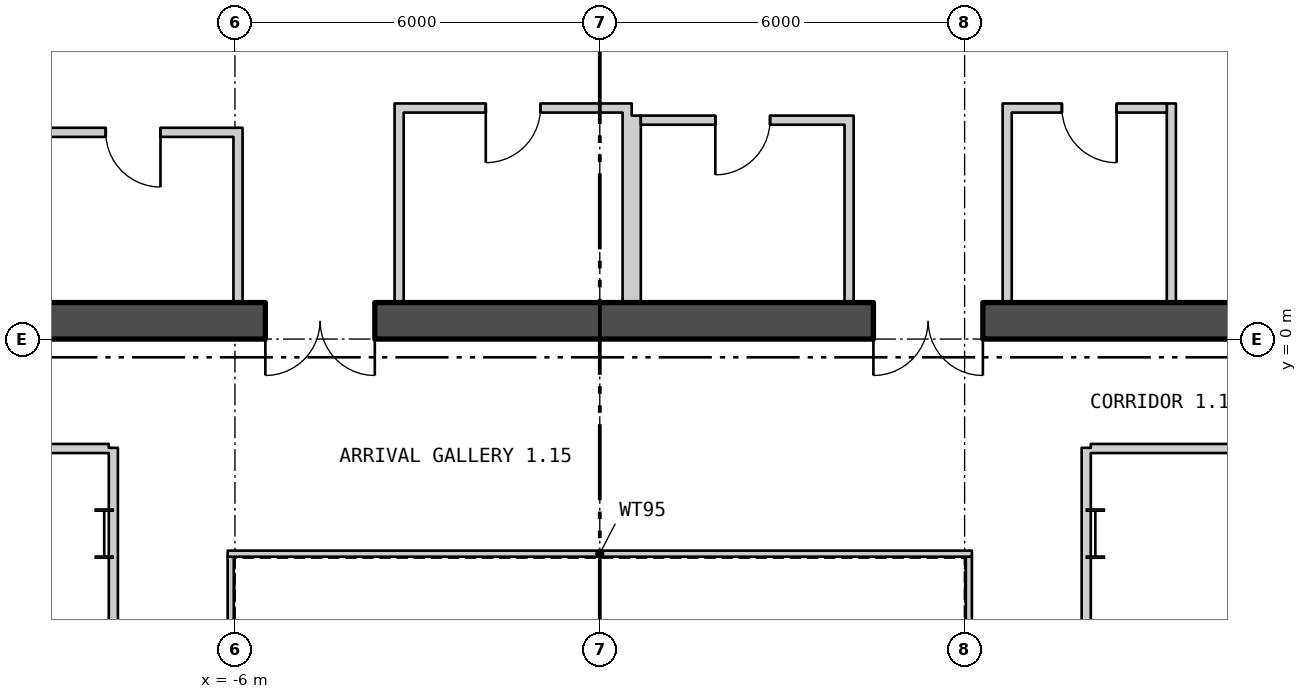
"""IFC4 building model, lengths in metres.
Left out: names, types, materials, properties, quantities, classifications, styles, units other than length and angle.
Written with IfcOpenShell. Run it as: python <this file> out.ifc"""

import sys

from ifc_helpers import new_model, si_unit, direction, frame, frame_2d, origin, origin_2d, place, context, subcontext, project, spatial, polyline, rectangle, i_section, outline, extrude, element, fill, save


model = new_model("IFC4")
c1 = context("Model", 3, precision=1e-05, world=origin(), true_north=direction((0.0, 1.0)))
c2 = subcontext(c1, "Body", "Model", "MODEL_VIEW")
j1 = project(units=[si_unit("LENGTHUNIT", "METRE"), si_unit("PLANEANGLEUNIT", "RADIAN")], contexts=[c1])
p1 = place(None, origin())
s1 = spatial("IfcSite", under=j1, at=p1, CompositionType="ELEMENT")
p2 = place(p1, origin())
s2 = spatial("IfcBuilding", under=s1, at=p2, CompositionType="ELEMENT")
p3 = place(p2, frame((0.0, 0.0, 28.8)))
s3 = spatial("IfcBuildingStorey", under=s2, at=p3, CompositionType="ELEMENT", Elevation=28.8)
for number, where, z_axis, x_axis in (
    (1, (8.15, -3.2, 0.0), (0.0, 0.0, 1.0), (1.0, 0.0, 0.0)),
    (2, (-8.15, -3.2, 0.0), (0.0, 0.0, 1.0), (1.0, 0.0, 0.0)),
):
    element("IfcColumn", number, at=place(p3, frame(where, z_axis=z_axis, x_axis=x_axis)), inside=s3, PredefinedType="COLUMN", context=c2, shape_type="SweptSolid", body=[
        extrude(i_section(OverallWidth=0.303, OverallDepth=0.814, WebThickness=0.021, FlangeThickness=0.04, at=origin_2d()), origin(), (0.0, 0.0, 1.0), 4.5),
    ])
p4 = place(p3, frame((-28.74, 9.808, -0.23), z_axis=(0.0, 0.0, 1.0), x_axis=(0.499999764979, -0.866025539474, 0.0)))
e3 = element("IfcWall", 3, at=p4, inside=s3, PredefinedType="SOLIDWALL", context=c2, shape_type="SweptSolid", body=[
    extrude(outline(polyline([(-0.13, -0.225), (45.87, -0.225), (45.61, 0.225), (0.13, 0.225), (-0.13, -0.225)])), origin(), (0.0, 0.0, 1.0), 4.55),
])
p5 = place(p4, frame((1.724, 0.0, 0.23)))
e4 = element("IfcOpeningElement", 4, at=p5, cuts=e3, PredefinedType="OPENING", context=c2, shape_type="SweptSolid", body=[
    extrude(rectangle(XDim=1.8, YDim=2.4, at=frame_2d((0.9, 1.2))), frame((0.0, 0.235, 0.0), z_axis=(0.0, -1.0, 0.0), x_axis=(1.0, 0.0, 0.0)), (0.0, 0.0, 1.0), 0.47),
])
p6 = place(p4, frame((5.893, 0.0, 1.13)))
e5 = element("IfcOpeningElement", 5, at=p6, cuts=e3, PredefinedType="OPENING", context=c2, shape_type="SweptSolid", body=[
    extrude(rectangle(XDim=2.4, YDim=2.6, at=frame_2d((1.2, 1.3))), frame((0.0, 0.235, 0.0), z_axis=(0.0, -1.0, 0.0), x_axis=(1.0, 0.0, 0.0)), (0.0, 0.0, 1.0), 0.47),
])
p7 = place(p4, frame((10.401, 0.0, 1.13)))
e6 = element("IfcOpeningElement", 6, at=p7, cuts=e3, PredefinedType="OPENING", context=c2, shape_type="SweptSolid", body=[
    extrude(rectangle(XDim=2.4, YDim=2.6, at=frame_2d((1.2, 1.3))), frame((0.0, 0.235, 0.0), z_axis=(0.0, -1.0, 0.0), x_axis=(1.0, 0.0, 0.0)), (0.0, 0.0, 1.0), 0.47),
])
p8 = place(p4, frame((14.909, 0.0, 1.13)))
e7 = element("IfcOpeningElement", 7, at=p8, cuts=e3, PredefinedType="OPENING", context=c2, shape_type="SweptSolid", body=[
    extrude(rectangle(XDim=2.4, YDim=2.6, at=frame_2d((1.2, 1.3))), frame((0.0, 0.235, 0.0), z_axis=(0.0, -1.0, 0.0), x_axis=(1.0, 0.0, 0.0)), (0.0, 0.0, 1.0), 0.47),
])
p9 = place(p4, frame((19.416, 0.0, 1.13)))
e8 = element("IfcOpeningElement", 8, at=p9, cuts=e3, PredefinedType="OPENING", context=c2, shape_type="SweptSolid", body=[
    extrude(rectangle(XDim=2.4, YDim=2.6, at=frame_2d((1.2, 1.3))), frame((0.0, 0.235, 0.0), z_axis=(0.0, -1.0, 0.0), x_axis=(1.0, 0.0, 0.0)), (0.0, 0.0, 1.0), 0.47),
])
p10 = place(p4, frame((23.924, 0.0, 1.13)))
e9 = element("IfcOpeningElement", 9, at=p10, cuts=e3, PredefinedType="OPENING", context=c2, shape_type="SweptSolid", body=[
    extrude(rectangle(XDim=2.4, YDim=2.6, at=frame_2d((1.2, 1.3))), frame((0.0, 0.235, 0.0), z_axis=(0.0, -1.0, 0.0), x_axis=(1.0, 0.0, 0.0)), (0.0, 0.0, 1.0), 0.47),
])
p11 = place(p4, frame((28.431, 0.0, 1.13)))
e10 = element("IfcOpeningElement", 10, at=p11, cuts=e3, PredefinedType="OPENING", context=c2, shape_type="SweptSolid", body=[
    extrude(rectangle(XDim=2.4, YDim=2.6, at=frame_2d((1.2, 1.3))), frame((0.0, 0.235, 0.0), z_axis=(0.0, -1.0, 0.0), x_axis=(1.0, 0.0, 0.0)), (0.0, 0.0, 1.0), 0.47),
])
p12 = place(p4, frame((33.239, 0.0, 0.23)))
e11 = element("IfcOpeningElement", 11, at=p12, cuts=e3, PredefinedType="OPENING", context=c2, shape_type="SweptSolid", body=[
    extrude(rectangle(XDim=1.8, YDim=2.4, at=frame_2d((0.9, 1.2))), frame((0.0, 0.235, 0.0), z_axis=(0.0, -1.0, 0.0), x_axis=(1.0, 0.0, 0.0)), (0.0, 0.0, 1.0), 0.47),
])
p13 = place(p4, frame((37.447, 0.0, 1.13)))
e12 = element("IfcOpeningElement", 12, at=p13, cuts=e3, PredefinedType="OPENING", context=c2, shape_type="SweptSolid", body=[
    extrude(rectangle(XDim=2.4, YDim=2.6, at=frame_2d((1.2, 1.3))), frame((0.0, 0.235, 0.0), z_axis=(0.0, -1.0, 0.0), x_axis=(1.0, 0.0, 0.0)), (0.0, 0.0, 1.0), 0.47),
])
p14 = place(p4, frame((41.916, 0.0, 1.13)))
e13 = element("IfcOpeningElement", 13, at=p14, cuts=e3, PredefinedType="OPENING", context=c2, shape_type="SweptSolid", body=[
    extrude(rectangle(XDim=2.4, YDim=2.6, at=frame_2d((1.2, 1.3))), frame((0.0, 0.235, 0.0), z_axis=(0.0, -1.0, 0.0), x_axis=(1.0, 0.0, 0.0)), (0.0, 0.0, 1.0), 0.47),
])
p15 = place(p3, frame((5.87, -29.805, -0.23), z_axis=(0.0, 0.0, 1.0), x_axis=(0.499999764979, 0.866025539474, 0.0)))
e14 = element("IfcWall", 14, at=p15, inside=s3, PredefinedType="SOLIDWALL", context=c2, shape_type="SweptSolid", body=[
    extrude(outline(polyline([(-0.13, -0.225), (45.87, -0.225), (45.61, 0.225), (0.13, 0.225), (-0.13, -0.225)])), origin(), (0.0, 0.0, 1.0), 4.55),
])
p16 = place(p15, frame((1.424, 0.0, 1.13)))
e15 = element("IfcOpeningElement", 15, at=p16, cuts=e14, PredefinedType="OPENING", context=c2, shape_type="SweptSolid", body=[
    extrude(rectangle(XDim=2.4, YDim=2.6, at=frame_2d((1.2, 1.3))), frame((0.0, 0.235, 0.0), z_axis=(0.0, -1.0, 0.0), x_axis=(1.0, 0.0, 0.0)), (0.0, 0.0, 1.0), 0.47),
])
p17 = place(p15, frame((5.893, 0.0, 1.13)))
e16 = element("IfcOpeningElement", 16, at=p17, cuts=e14, PredefinedType="OPENING", context=c2, shape_type="SweptSolid", body=[
    extrude(rectangle(XDim=2.4, YDim=2.6, at=frame_2d((1.2, 1.3))), frame((0.0, 0.235, 0.0), z_axis=(0.0, -1.0, 0.0), x_axis=(1.0, 0.0, 0.0)), (0.0, 0.0, 1.0), 0.47),
])
p18 = place(p15, frame((10.701, 0.0, 0.23)))
e17 = element("IfcOpeningElement", 17, at=p18, cuts=e14, PredefinedType="OPENING", context=c2, shape_type="SweptSolid", body=[
    extrude(rectangle(XDim=1.8, YDim=2.4, at=frame_2d((0.9, 1.2))), frame((0.0, 0.235, 0.0), z_axis=(0.0, -1.0, 0.0), x_axis=(1.0, 0.0, 0.0)), (0.0, 0.0, 1.0), 0.47),
])
p19 = place(p15, frame((14.909, 0.0, 1.13)))
e18 = element("IfcOpeningElement", 18, at=p19, cuts=e14, PredefinedType="OPENING", context=c2, shape_type="SweptSolid", body=[
    extrude(rectangle(XDim=2.4, YDim=2.6, at=frame_2d((1.2, 1.3))), frame((0.0, 0.235, 0.0), z_axis=(0.0, -1.0, 0.0), x_axis=(1.0, 0.0, 0.0)), (0.0, 0.0, 1.0), 0.47),
])
p20 = place(p15, frame((19.416, 0.0, 1.13)))
e19 = element("IfcOpeningElement", 19, at=p20, cuts=e14, PredefinedType="OPENING", context=c2, shape_type="SweptSolid", body=[
    extrude(rectangle(XDim=2.4, YDim=2.6, at=frame_2d((1.2, 1.3))), frame((0.0, 0.235, 0.0), z_axis=(0.0, -1.0, 0.0), x_axis=(1.0, 0.0, 0.0)), (0.0, 0.0, 1.0), 0.47),
])
p21 = place(p15, frame((23.924, 0.0, 1.13)))
e20 = element("IfcOpeningElement", 20, at=p21, cuts=e14, PredefinedType="OPENING", context=c2, shape_type="SweptSolid", body=[
    extrude(rectangle(XDim=2.4, YDim=2.6, at=frame_2d((1.2, 1.3))), frame((0.0, 0.235, 0.0), z_axis=(0.0, -1.0, 0.0), x_axis=(1.0, 0.0, 0.0)), (0.0, 0.0, 1.0), 0.47),
])
p22 = place(p15, frame((37.447, 0.0, 1.13)))
e21 = element("IfcOpeningElement", 21, at=p22, cuts=e14, PredefinedType="OPENING", context=c2, shape_type="SweptSolid", body=[
    extrude(rectangle(XDim=2.4, YDim=2.6, at=frame_2d((1.2, 1.3))), frame((0.0, 0.235, 0.0), z_axis=(0.0, -1.0, 0.0), x_axis=(1.0, 0.0, 0.0)), (0.0, 0.0, 1.0), 0.47),
])
p23 = place(p15, frame((42.216, 0.0, 0.23)))
e22 = element("IfcOpeningElement", 22, at=p23, cuts=e14, PredefinedType="OPENING", context=c2, shape_type="SweptSolid", body=[
    extrude(rectangle(XDim=1.8, YDim=2.4, at=frame_2d((0.9, 1.2))), frame((0.0, 0.235, 0.0), z_axis=(0.0, -1.0, 0.0), x_axis=(1.0, 0.0, 0.0)), (0.0, 0.0, 1.0), 0.47),
])
p24 = place(p3, frame((6.07, -11.62, 0.0), z_axis=(0.0, 0.0, 1.0), x_axis=(0.0, 1.0, 0.0)))
e23 = element("IfcWall", 23, at=p24, inside=s3, PredefinedType="PARTITIONING", context=c2, shape_type="SweptSolid", body=[
    extrude(rectangle(XDim=8.04, YDim=0.1, at=frame_2d((4.02, 0.0))), origin(), (0.0, 0.0, 1.0), 4.3),
])
p25 = place(p3, frame((6.12, -3.53, 0.0), z_axis=(0.0, 0.0, 1.0), x_axis=(-1.0, 0.0, 0.0)))
e24 = element("IfcWall", 24, at=p25, inside=s3, PredefinedType="PARTITIONING", context=c2, shape_type="SweptSolid", body=[
    extrude(rectangle(XDim=12.24, YDim=0.1, at=frame_2d((6.12, 0.0))), origin(), (0.0, 0.0, 1.0), 4.3),
])
p26 = place(p3, frame((-6.07, -3.58, 0.0), z_axis=(0.0, 0.0, 1.0), x_axis=(0.0, -1.0, 0.0)))
e25 = element("IfcWall", 25, at=p26, inside=s3, PredefinedType="PARTITIONING", context=c2, shape_type="SweptSolid", body=[
    extrude(rectangle(XDim=8.04, YDim=0.1, at=frame_2d((4.02, 0.0))), origin(), (0.0, 0.0, 1.0), 4.3),
])
p27 = place(p3, frame((-17.5, 0.3, 0.0), z_axis=(0.0, 0.0, 1.0), x_axis=(1.0, 0.0, 0.0)))
e26 = element("IfcWall", 26, at=p27, inside=s3, PredefinedType="SHEAR", context=c2, shape_type="SweptSolid", body=[
    extrude(rectangle(XDim=35.0, YDim=0.6, at=frame_2d((17.5, 0.0))), origin(), (0.0, 0.0, 1.0), 4.3),
])
p28 = place(p27, frame((12.0, 0.0, 0.0)))
e27 = element("IfcOpeningElement", 27, at=p28, cuts=e26, PredefinedType="OPENING", context=c2, shape_type="SweptSolid", body=[
    extrude(rectangle(XDim=1.8, YDim=2.4, at=frame_2d((0.9, 1.2))), frame((0.0, 0.31, 0.0), z_axis=(0.0, -1.0, 0.0), x_axis=(1.0, 0.0, 0.0)), (0.0, 0.0, 1.0), 0.62),
])
p29 = place(p27, frame((22.0, 0.0, 0.0)))
e28 = element("IfcOpeningElement", 28, at=p29, cuts=e26, PredefinedType="OPENING", context=c2, shape_type="SweptSolid", body=[
    extrude(rectangle(XDim=1.8, YDim=2.4, at=frame_2d((0.9, 1.2))), frame((0.0, 0.31, 0.0), z_axis=(0.0, -1.0, 0.0), x_axis=(1.0, 0.0, 0.0)), (0.0, 0.0, 1.0), 0.62),
])
p30 = place(p3, frame((-5.95, 0.6, 0.0), z_axis=(0.0, 0.0, 1.0), x_axis=(0.0, 1.0, 0.0)))
e29 = element("IfcWall", 29, at=p30, inside=s3, PredefinedType="PARTITIONING", context=c2, shape_type="SweptSolid", body=[
    extrude(rectangle(XDim=2.875, YDim=0.15, at=frame_2d((1.438, 0.0))), origin(), (0.0, 0.0, 1.0), 4.3),
])
p31 = place(p3, frame((-9.325, 3.4, 0.0), z_axis=(0.0, 0.0, 1.0), x_axis=(1.0, 0.0, 0.0)))
e30 = element("IfcWall", 30, at=p31, inside=s3, PredefinedType="PARTITIONING", context=c2, shape_type="SweptSolid", body=[
    extrude(rectangle(XDim=3.3, YDim=0.15, at=frame_2d((1.65, 0.0))), origin(), (0.0, 0.0, 1.0), 4.3),
])
p32 = place(p31, frame((1.2, 0.0, 0.0)))
e31 = element("IfcOpeningElement", 31, at=p32, cuts=e30, PredefinedType="OPENING", context=c2, shape_type="SweptSolid", body=[
    extrude(rectangle(XDim=0.9, YDim=2.1, at=frame_2d((0.45, 1.05))), frame((0.0, 0.085, 0.0), z_axis=(0.0, -1.0, 0.0), x_axis=(1.0, 0.0, 0.0)), (0.0, 0.0, 1.0), 0.17),
])
for number, where, z_axis, x_axis in (
    (32, (-3.3, 0.6, 0.0), (0.0, 0.0, 1.0), (0.0, 1.0, 0.0)),
    (33, (0.45, 0.6, 0.0), (0.0, 0.0, 1.0), (0.0, 1.0, 0.0)),
):
    element("IfcWall", number, at=place(p3, frame(where, z_axis=z_axis, x_axis=x_axis)), inside=s3, PredefinedType="PARTITIONING", context=c2, shape_type="SweptSolid", body=[
        extrude(rectangle(XDim=3.275, YDim=0.15, at=frame_2d((1.637, 0.0))), origin(), (0.0, 0.0, 1.0), 4.3),
    ])
p33 = place(p3, frame((-3.225, 3.8, 0.0), z_axis=(0.0, 0.0, 1.0), x_axis=(1.0, 0.0, 0.0)))
e34 = element("IfcWall", 34, at=p33, inside=s3, PredefinedType="PARTITIONING", context=c2, shape_type="SweptSolid", body=[
    extrude(rectangle(XDim=3.6, YDim=0.15, at=frame_2d((1.8, 0.0))), origin(), (0.0, 0.0, 1.0), 4.3),
])
p34 = place(p33, frame((1.35, 0.0, 0.0)))
e35 = element("IfcOpeningElement", 35, at=p34, cuts=e34, PredefinedType="OPENING", context=c2, shape_type="SweptSolid", body=[
    extrude(rectangle(XDim=0.9, YDim=2.1, at=frame_2d((0.45, 1.05))), frame((0.0, 0.085, 0.0), z_axis=(0.0, -1.0, 0.0), x_axis=(1.0, 0.0, 0.0)), (0.0, 0.0, 1.0), 0.17),
])
for number, where, z_axis, x_axis in (
    (36, (0.6, 0.6, 0.0), (0.0, 0.0, 1.0), (0.0, 1.0, 0.0)),
    (37, (4.1, 0.6, 0.0), (0.0, 0.0, 1.0), (0.0, 1.0, 0.0)),
):
    element("IfcWall", number, at=place(p3, frame(where, z_axis=z_axis, x_axis=x_axis)), inside=s3, PredefinedType="PARTITIONING", context=c2, shape_type="SweptSolid", body=[
        extrude(rectangle(XDim=3.075, YDim=0.15, at=frame_2d((1.538, 0.0))), origin(), (0.0, 0.0, 1.0), 4.3),
    ])
p35 = place(p3, frame((0.675, 3.6, 0.0), z_axis=(0.0, 0.0, 1.0), x_axis=(1.0, 0.0, 0.0)))
e38 = element("IfcWall", 38, at=p35, inside=s3, PredefinedType="PARTITIONING", context=c2, shape_type="SweptSolid", body=[
    extrude(rectangle(XDim=3.35, YDim=0.15, at=frame_2d((1.675, 0.0))), origin(), (0.0, 0.0, 1.0), 4.3),
])
p36 = place(p35, frame((1.225, 0.0, 0.0)))
e39 = element("IfcOpeningElement", 39, at=p36, cuts=e38, PredefinedType="OPENING", context=c2, shape_type="SweptSolid", body=[
    extrude(rectangle(XDim=0.9, YDim=2.1, at=frame_2d((0.45, 1.05))), frame((0.0, 0.085, 0.0), z_axis=(0.0, -1.0, 0.0), x_axis=(1.0, 0.0, 0.0)), (0.0, 0.0, 1.0), 0.17),
])
for number, where, z_axis, x_axis in (
    (40, (6.7, 0.6, 0.0), (0.0, 0.0, 1.0), (0.0, 1.0, 0.0)),
    (41, (9.4, 0.6, 0.0), (0.0, 0.0, 1.0), (0.0, 1.0, 0.0)),
):
    element("IfcWall", number, at=place(p3, frame(where, z_axis=z_axis, x_axis=x_axis)), inside=s3, PredefinedType="PARTITIONING", context=c2, shape_type="SweptSolid", body=[
        extrude(rectangle(XDim=3.275, YDim=0.15, at=frame_2d((1.637, 0.0))), origin(), (0.0, 0.0, 1.0), 4.3),
    ])
p37 = place(p3, frame((6.775, 3.8, 0.0), z_axis=(0.0, 0.0, 1.0), x_axis=(1.0, 0.0, 0.0)))
e42 = element("IfcWall", 42, at=p37, inside=s3, PredefinedType="PARTITIONING", context=c2, shape_type="SweptSolid", body=[
    extrude(rectangle(XDim=2.55, YDim=0.15, at=frame_2d((1.275, 0.0))), origin(), (0.0, 0.0, 1.0), 4.3),
])
p38 = place(p37, frame((0.825, 0.0, 0.0)))
e43 = element("IfcOpeningElement", 43, at=p38, cuts=e42, PredefinedType="OPENING", context=c2, shape_type="SweptSolid", body=[
    extrude(rectangle(XDim=0.9, YDim=2.1, at=frame_2d((0.45, 1.05))), frame((0.0, 0.085, 0.0), z_axis=(0.0, -1.0, 0.0), x_axis=(1.0, 0.0, 0.0)), (0.0, 0.0, 1.0), 0.17),
])
p39 = place(p3, frame((-19.225, -1.8, 0.0), z_axis=(0.0, 0.0, 1.0), x_axis=(1.0, 0.0, 0.0)))
e44 = element("IfcWall", 44, at=p39, inside=s3, PredefinedType="PARTITIONING", context=c2, shape_type="SweptSolid", body=[
    extrude(rectangle(XDim=11.15, YDim=0.15, at=frame_2d((5.575, 0.0))), origin(), (0.0, 0.0, 1.0), 4.3),
])
p40 = place(p39, frame((0.369, 0.0, 0.0)))
e45 = element("IfcOpeningElement", 45, at=p40, cuts=e44, PredefinedType="OPENING", context=c2, shape_type="SweptSolid", body=[
    extrude(rectangle(XDim=1.0, YDim=2.1, at=frame_2d((0.5, 1.05))), frame((0.0, 0.085, 0.0), z_axis=(0.0, -1.0, 0.0), x_axis=(1.0, 0.0, 0.0)), (0.0, 0.0, 1.0), 0.17),
])
p41 = place(p3, frame((-8.0, -13.675, 0.0), z_axis=(0.0, 0.0, 1.0), x_axis=(0.0, 1.0, 0.0)))
e46 = element("IfcWall", 46, at=p41, inside=s3, PredefinedType="PARTITIONING", context=c2, shape_type="SweptSolid", body=[
    extrude(rectangle(XDim=10.475, YDim=0.15, at=frame_2d((5.237, 0.0))), origin(), (0.0, 0.0, 1.0), 3.61),
])
p42 = place(p3, frame((-8.0, -3.2, 0.0), z_axis=(0.0, 0.0, 1.0), x_axis=(0.0, 1.0, 0.0)))
e47 = element("IfcWall", 47, at=p42, inside=s3, PredefinedType="PARTITIONING", context=c2, shape_type="SweptSolid", body=[
    extrude(rectangle(XDim=1.411, YDim=0.15, at=frame_2d((0.706, 0.0))), origin(), (0.0, 0.0, 1.0), 4.3),
])
p43 = place(p3, frame((8.0, -13.675, 0.0), z_axis=(0.0, 0.0, 1.0), x_axis=(0.0, 1.0, 0.0)))
e48 = element("IfcWall", 48, at=p43, inside=s3, PredefinedType="PARTITIONING", context=c2, shape_type="SweptSolid", body=[
    extrude(rectangle(XDim=10.475, YDim=0.15, at=frame_2d((5.237, 0.0))), origin(), (0.0, 0.0, 1.0), 3.61),
])
p44 = place(p3, frame((8.0, -3.2, 0.0), z_axis=(0.0, 0.0, 1.0), x_axis=(0.0, 1.0, 0.0)))
e49 = element("IfcWall", 49, at=p44, inside=s3, PredefinedType="PARTITIONING", context=c2, shape_type="SweptSolid", body=[
    extrude(rectangle(XDim=1.411, YDim=0.15, at=frame_2d((0.706, 0.0))), origin(), (0.0, 0.0, 1.0), 4.3),
])
p45 = place(p3, frame((8.075, -1.8, 0.0), z_axis=(0.0, 0.0, 1.0), x_axis=(1.0, 0.0, 0.0)))
e50 = element("IfcWall", 50, at=p45, inside=s3, PredefinedType="PARTITIONING", context=c2, shape_type="SweptSolid", body=[
    extrude(rectangle(XDim=11.15, YDim=0.15, at=frame_2d((5.575, 0.0))), origin(), (0.0, 0.0, 1.0), 4.3),
])
p46 = place(p45, frame((2.845, 0.0, 0.0)))
e51 = element("IfcOpeningElement", 51, at=p46, cuts=e50, PredefinedType="OPENING", context=c2, shape_type="SweptSolid", body=[
    extrude(rectangle(XDim=1.0, YDim=2.1, at=frame_2d((0.5, 1.05))), frame((0.0, 0.085, 0.0), z_axis=(0.0, -1.0, 0.0), x_axis=(1.0, 0.0, 0.0)), (0.0, 0.0, 1.0), 0.17),
])
p47 = place(p45, frame((6.395, 0.0, 0.0)))
e52 = element("IfcOpeningElement", 52, at=p47, cuts=e50, PredefinedType="OPENING", context=c2, shape_type="SweptSolid", body=[
    extrude(rectangle(XDim=1.0, YDim=2.1, at=frame_2d((0.5, 1.05))), frame((0.0, 0.085, 0.0), z_axis=(0.0, -1.0, 0.0), x_axis=(1.0, 0.0, 0.0)), (0.0, 0.0, 1.0), 0.17),
])
p48 = place(p32, origin())
e53 = element("IfcDoor", 53, at=p48, inside=s3, OperationType="SINGLE_SWING_RIGHT", PredefinedType="DOOR", context=c2, shape_type="SweptSolid", body=[
    extrude(rectangle(XDim=0.9, YDim=2.1, at=frame_2d((0.45, 1.05))), frame((0.0, 0.025, 0.0), z_axis=(0.0, -1.0, 0.0), x_axis=(1.0, 0.0, 0.0)), (0.0, 0.0, 1.0), 0.05),
])
fill(e31, e53)
p49 = place(p34, origin())
e54 = element("IfcDoor", 54, at=p49, inside=s3, OperationType="SINGLE_SWING_LEFT", PredefinedType="DOOR", context=c2, shape_type="SweptSolid", body=[
    extrude(rectangle(XDim=0.9, YDim=2.1, at=frame_2d((0.45, 1.05))), frame((0.0, 0.025, 0.0), z_axis=(0.0, -1.0, 0.0), x_axis=(1.0, 0.0, 0.0)), (0.0, 0.0, 1.0), 0.05),
])
fill(e35, e54)
p50 = place(p36, origin())
e55 = element("IfcDoor", 55, at=p50, inside=s3, OperationType="SINGLE_SWING_LEFT", PredefinedType="DOOR", context=c2, shape_type="SweptSolid", body=[
    extrude(rectangle(XDim=0.9, YDim=2.1, at=frame_2d((0.45, 1.05))), frame((0.0, 0.025, 0.0), z_axis=(0.0, -1.0, 0.0), x_axis=(1.0, 0.0, 0.0)), (0.0, 0.0, 1.0), 0.05),
])
fill(e39, e55)
p51 = place(p38, origin())
e56 = element("IfcDoor", 56, at=p51, inside=s3, OperationType="SINGLE_SWING_RIGHT", PredefinedType="DOOR", context=c2, shape_type="SweptSolid", body=[
    extrude(rectangle(XDim=0.9, YDim=2.1, at=frame_2d((0.45, 1.05))), frame((0.0, 0.025, 0.0), z_axis=(0.0, -1.0, 0.0), x_axis=(1.0, 0.0, 0.0)), (0.0, 0.0, 1.0), 0.05),
])
fill(e43, e56)
p52 = place(p28, origin())
e57 = element("IfcDoor", 57, at=p52, inside=s3, OperationType="DOUBLE_DOOR_SINGLE_SWING", PredefinedType="DOOR", context=c2, shape_type="SweptSolid", body=[
    extrude(rectangle(XDim=1.8, YDim=2.4, at=frame_2d((0.9, 1.2))), frame((0.0, 0.025, 0.0), z_axis=(0.0, -1.0, 0.0), x_axis=(1.0, 0.0, 0.0)), (0.0, 0.0, 1.0), 0.05),
])
fill(e27, e57)
p53 = place(p29, origin())
e58 = element("IfcDoor", 58, at=p53, inside=s3, OperationType="DOUBLE_DOOR_SINGLE_SWING", PredefinedType="DOOR", context=c2, shape_type="SweptSolid", body=[
    extrude(rectangle(XDim=1.8, YDim=2.4, at=frame_2d((0.9, 1.2))), frame((0.0, 0.025, 0.0), z_axis=(0.0, -1.0, 0.0), x_axis=(1.0, 0.0, 0.0)), (0.0, 0.0, 1.0), 0.05),
])
fill(e28, e58)
save(model, sys.argv[1])
